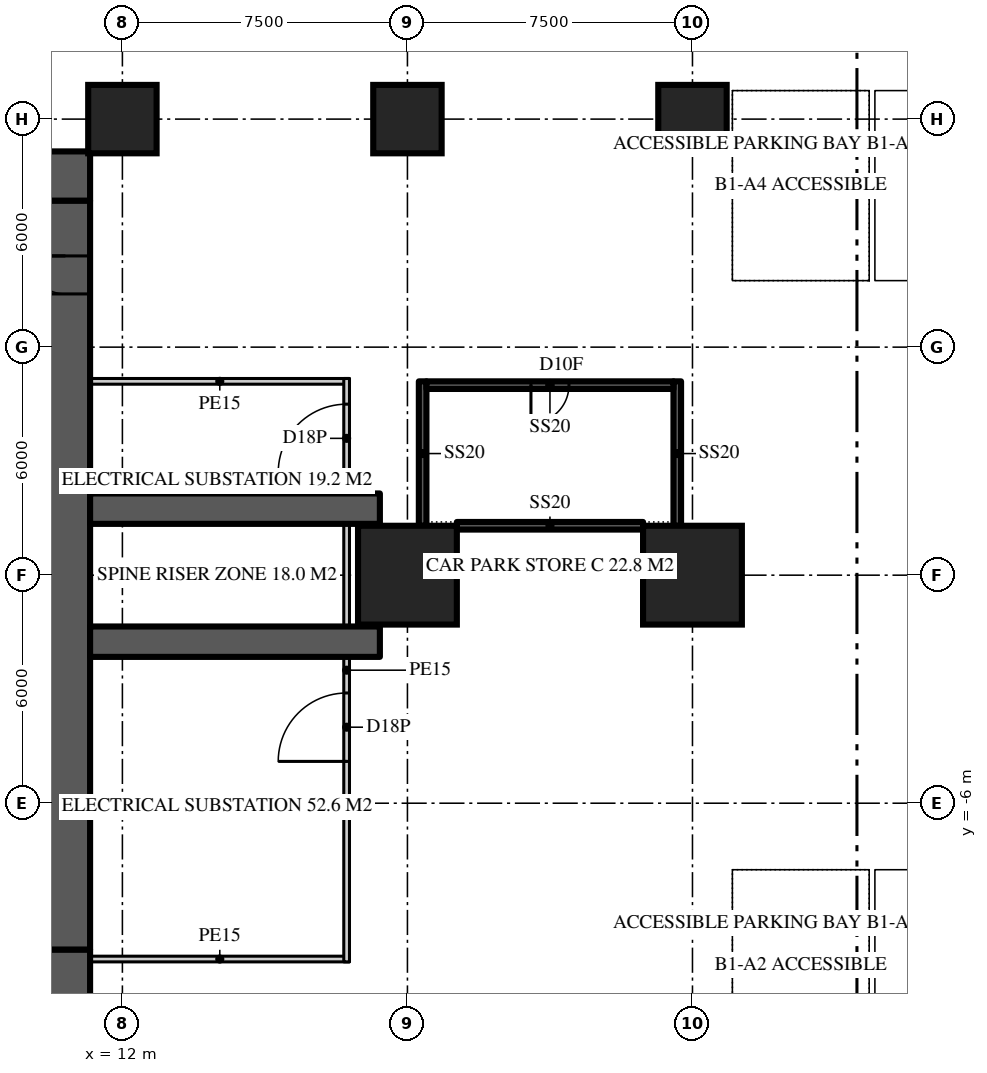
"""IFC4 building model, lengths in metres.
Left out: names, types, materials, properties, quantities, classifications, styles, units other than length and angle.
Written with IfcOpenShell. Run it as: python <this file> out.ifc"""

import sys

from ifc_helpers import new_model, si_unit, direction, frame, frame_2d, origin, origin_2d, place, context, subcontext, project, spatial, rectangle, extrude, element, fill, save


model = new_model("IFC4")
c1 = context("Model", 3, precision=1e-05, world=origin(), true_north=direction((0.0, 1.0)))
c2 = subcontext(c1, "Body", "Model", "MODEL_VIEW")
j1 = project(units=[si_unit("LENGTHUNIT", "METRE"), si_unit("PLANEANGLEUNIT", "RADIAN")], contexts=[c1])
p1 = place(None, origin())
s1 = spatial("IfcSite", under=j1, at=p1, CompositionType="ELEMENT")
p2 = place(p1, origin())
s2 = spatial("IfcBuilding", under=s1, at=p2, CompositionType="ELEMENT")
p3 = place(p2, frame((0.0, 0.0, -5.0)))
s3 = spatial("IfcBuildingStorey", under=s2, at=p3, CompositionType="ELEMENT", Elevation=-5.0)
p4 = place(p3, frame((-11.15, 10.5, 0.0), z_axis=(0.0, 0.0, 1.0), x_axis=(1.0, 0.0, 0.0)))
e1 = element("IfcWall", 1, at=p4, inside=s3, PredefinedType="SHEAR", context=c2, shape_type="SweptSolid", body=[
    extrude(rectangle(XDim=22.3, YDim=1.3, at=frame_2d((11.15, 0.0))), origin(), (0.0, 0.0, 1.0), 5.0),
])
p5 = place(p4, frame((4.25, 0.0, 0.0)))
e2 = element("IfcOpeningElement", 2, at=p5, cuts=e1, PredefinedType="OPENING", context=c2, shape_type="SweptSolid", body=[
    extrude(rectangle(XDim=1.8, YDim=2.2, at=frame_2d((0.9, 1.1))), frame((0.0, 0.66, 0.0), z_axis=(0.0, -1.0, 0.0), x_axis=(1.0, 0.0, 0.0)), (0.0, 0.0, 1.0), 1.32),
])
p6 = place(p4, frame((16.25, 0.0, 0.0)))
e3 = element("IfcOpeningElement", 3, at=p6, cuts=e1, PredefinedType="OPENING", context=c2, shape_type="SweptSolid", body=[
    extrude(rectangle(XDim=1.8, YDim=2.2, at=frame_2d((0.9, 1.1))), frame((0.0, 0.66, 0.0), z_axis=(0.0, -1.0, 0.0), x_axis=(1.0, 0.0, 0.0)), (0.0, 0.0, 1.0), 1.32),
])
p7 = place(p3, frame((11.15, -10.5, 0.0), z_axis=(0.0, 0.0, 1.0), x_axis=(-1.0, 0.0, 0.0)))
e4 = element("IfcWall", 4, at=p7, inside=s3, PredefinedType="SHEAR", context=c2, shape_type="SweptSolid", body=[
    extrude(rectangle(XDim=22.3, YDim=1.3, at=frame_2d((11.15, 0.0))), origin(), (0.0, 0.0, 1.0), 5.0),
])
p8 = place(p7, frame((16.25, 0.0, 0.0)))
e5 = element("IfcOpeningElement", 5, at=p8, cuts=e4, PredefinedType="OPENING", context=c2, shape_type="SweptSolid", body=[
    extrude(rectangle(XDim=1.8, YDim=2.2, at=frame_2d((0.9, 1.1))), frame((0.0, 0.66, 0.0), z_axis=(0.0, -1.0, 0.0), x_axis=(1.0, 0.0, 0.0)), (0.0, 0.0, 1.0), 1.32),
])
p9 = place(p7, frame((4.25, 0.0, 0.0)))
e6 = element("IfcOpeningElement", 6, at=p9, cuts=e4, PredefinedType="OPENING", context=c2, shape_type="SweptSolid", body=[
    extrude(rectangle(XDim=1.8, YDim=2.2, at=frame_2d((0.9, 1.1))), frame((0.0, 0.66, 0.0), z_axis=(0.0, -1.0, 0.0), x_axis=(1.0, 0.0, 0.0)), (0.0, 0.0, 1.0), 1.32),
])
p10 = place(p3, frame((10.5, -9.85, 0.0), z_axis=(0.0, 0.0, 1.0), x_axis=(0.0, 1.0, 0.0)))
e7 = element("IfcWall", 7, at=p10, inside=s3, PredefinedType="SHEAR", context=c2, shape_type="SweptSolid", body=[
    extrude(rectangle(XDim=19.7, YDim=1.3, at=frame_2d((9.85, 0.0))), origin(), (0.0, 0.0, 1.0), 5.0),
])
p11 = place(p10, frame((17.25, 0.0, 0.0)))
e8 = element("IfcOpeningElement", 8, at=p11, cuts=e7, PredefinedType="OPENING", context=c2, shape_type="SweptSolid", body=[
    extrude(rectangle(XDim=1.0, YDim=2.2, at=frame_2d((0.5, 1.1))), frame((0.0, 0.66, 0.0), z_axis=(0.0, -1.0, 0.0), x_axis=(1.0, 0.0, 0.0)), (0.0, 0.0, 1.0), 1.32),
])
for number, where, z_axis, x_axis in (
    (9, (11.15, -1.75, 0.0), (0.0, 0.0, 1.0), (1.0, 0.0, 0.0)),
    (10, (11.15, 1.75, 0.0), (0.0, 0.0, 1.0), (1.0, 0.0, 0.0)),
):
    element("IfcWall", number, at=place(p3, frame(where, z_axis=z_axis, x_axis=x_axis)), inside=s3, PredefinedType="SHEAR", context=c2, shape_type="SweptSolid", body=[
        extrude(rectangle(XDim=7.625, YDim=0.8, at=frame_2d((3.812, 0.0))), origin(), (0.0, 0.0, 1.0), 5.0),
    ])
for number, where, z_axis, x_axis in (
    (11, (19.5, 0.0, 0.0), (0.0, 0.0, 1.0), (1.0, 0.0, 0.0)),
    (12, (27.0, 0.0, 0.0), (0.0, 0.0, 1.0), (1.0, 0.0, 0.0)),
):
    element("IfcColumn", number, at=place(p3, frame(where, z_axis=z_axis, x_axis=x_axis)), inside=s3, PredefinedType="COLUMN", context=c2, shape_type="SweptSolid", body=[
        extrude(rectangle(XDim=2.6, YDim=2.6, at=origin_2d()), origin(), (0.0, 0.0, 1.0), 5.0),
    ])
for number, where, z_axis, x_axis in (
    (13, (12.0, 12.0, 0.0), (0.0, 0.0, 1.0), (1.0, 0.0, 0.0)),
    (14, (19.5, 12.0, 0.0), (0.0, 0.0, 1.0), (1.0, 0.0, 0.0)),
    (15, (27.0, 12.0, 0.0), (0.0, 0.0, 1.0), (1.0, 0.0, 0.0)),
):
    element("IfcColumn", number, at=place(p3, frame(where, z_axis=z_axis, x_axis=x_axis)), inside=s3, PredefinedType="COLUMN", context=c2, shape_type="SweptSolid", body=[
        extrude(rectangle(XDim=1.8, YDim=1.8, at=origin_2d()), origin(), (0.0, 0.0, 1.0), 5.0),
    ])
for number, where, z_axis, x_axis in (
    (16, (11.15, -10.1, 0.0), (0.0, 0.0, 1.0), (1.0, 0.0, 0.0)),
    (17, (11.15, 5.1, 0.0), (0.0, 0.0, 1.0), (1.0, 0.0, 0.0)),
):
    element("IfcWall", number, at=place(p3, frame(where, z_axis=z_axis, x_axis=x_axis)), inside=s3, PredefinedType="SOLIDWALL", context=c2, shape_type="SweptSolid", body=[
        extrude(rectangle(XDim=6.825, YDim=0.15, at=frame_2d((3.413, 0.0))), origin(), (0.0, 0.0, 1.0), 4.6),
    ])
p12 = place(p3, frame((17.9, -10.175, 0.0), z_axis=(0.0, 0.0, 1.0), x_axis=(0.0, 1.0, 0.0)))
e18 = element("IfcWall", 18, at=p12, inside=s3, PredefinedType="SOLIDWALL", context=c2, shape_type="SweptSolid", body=[
    extrude(rectangle(XDim=15.35, YDim=0.15, at=frame_2d((7.675, 0.0))), origin(), (0.0, 0.0, 1.0), 4.6),
])
p13 = place(p12, frame((5.275, 0.0, 0.0)))
e19 = element("IfcOpeningElement", 19, at=p13, cuts=e18, PredefinedType="OPENING", context=c2, shape_type="SweptSolid", body=[
    extrude(rectangle(XDim=1.8, YDim=2.4, at=frame_2d((0.9, 1.2))), frame((0.0, 0.085, 0.0), z_axis=(0.0, -1.0, 0.0), x_axis=(1.0, 0.0, 0.0)), (0.0, 0.0, 1.0), 0.17),
])
p14 = place(p12, frame((12.875, 0.0, 0.0)))
e20 = element("IfcOpeningElement", 20, at=p14, cuts=e18, PredefinedType="OPENING", context=c2, shape_type="SweptSolid", body=[
    extrude(rectangle(XDim=1.8, YDim=2.4, at=frame_2d((0.9, 1.2))), frame((0.0, 0.085, 0.0), z_axis=(0.0, -1.0, 0.0), x_axis=(1.0, 0.0, 0.0)), (0.0, 0.0, 1.0), 0.17),
])
for number, where, z_axis, x_axis in (
    (21, (19.9, 1.3, 0.0), (0.0, 0.0, 1.0), (0.0, 1.0, 0.0)),
    (22, (26.6, 5.1, 0.0), (0.0, 0.0, 1.0), (0.0, -1.0, 0.0)),
):
    element("IfcWall", number, at=place(p3, frame(where, z_axis=z_axis, x_axis=x_axis)), inside=s3, PredefinedType="SOLIDWALL", context=c2, shape_type="SweptSolid", body=[
        extrude(rectangle(XDim=3.8, YDim=0.2, at=frame_2d((1.9, 0.0))), origin(), (0.0, 0.0, 1.0), 4.7),
    ])
p15 = place(p3, frame((20.8, 1.3, 0.0), z_axis=(0.0, 0.0, 1.0), x_axis=(1.0, 0.0, 0.0)))
e23 = element("IfcWall", 23, at=p15, inside=s3, PredefinedType="SOLIDWALL", context=c2, shape_type="SweptSolid", body=[
    extrude(rectangle(XDim=4.9, YDim=0.2, at=frame_2d((2.45, 0.0))), origin(), (0.0, 0.0, 1.0), 4.7),
])
p16 = place(p3, frame((26.5, 5.0, 0.0), z_axis=(0.0, 0.0, 1.0), x_axis=(-1.0, 0.0, 0.0)))
e24 = element("IfcWall", 24, at=p16, inside=s3, PredefinedType="SOLIDWALL", context=c2, shape_type="SweptSolid", body=[
    extrude(rectangle(XDim=6.5, YDim=0.2, at=frame_2d((3.25, 0.0))), origin(), (0.0, 0.0, 1.0), 4.7),
])
p17 = place(p16, frame((2.75, 0.0, 0.0)))
e25 = element("IfcOpeningElement", 25, at=p17, cuts=e24, PredefinedType="OPENING", context=c2, shape_type="SweptSolid", body=[
    extrude(rectangle(XDim=1.0, YDim=2.2, at=frame_2d((0.5, 1.1))), frame((0.0, 0.11, 0.0), z_axis=(0.0, -1.0, 0.0), x_axis=(1.0, 0.0, 0.0)), (0.0, 0.0, 1.0), 0.22),
])
p18 = place(p11, origin())
e26 = element("IfcDoor", 26, at=p18, inside=s3, OperationType="SINGLE_SWING_RIGHT", PredefinedType="DOOR", context=c2, shape_type="SweptSolid", body=[
    extrude(rectangle(XDim=1.0, YDim=2.2, at=frame_2d((0.5, 1.1))), frame((0.0, 0.025, 0.0), z_axis=(0.0, -1.0, 0.0), x_axis=(1.0, 0.0, 0.0)), (0.0, 0.0, 1.0), 0.05),
])
fill(e8, e26)
p19 = place(p13, origin())
e27 = element("IfcDoor", 27, at=p19, inside=s3, OperationType="DOUBLE_DOOR_DOUBLE_SWING", PredefinedType="DOOR", context=c2, shape_type="SweptSolid", body=[
    extrude(rectangle(XDim=1.8, YDim=2.4, at=frame_2d((0.9, 1.2))), frame((0.0, 0.025, 0.0), z_axis=(0.0, -1.0, 0.0), x_axis=(1.0, 0.0, 0.0)), (0.0, 0.0, 1.0), 0.05),
])
fill(e19, e27)
p20 = place(p14, origin())
e28 = element("IfcDoor", 28, at=p20, inside=s3, OperationType="DOUBLE_DOOR_DOUBLE_SWING", PredefinedType="DOOR", context=c2, shape_type="SweptSolid", body=[
    extrude(rectangle(XDim=1.8, YDim=2.4, at=frame_2d((0.9, 1.2))), frame((0.0, 0.025, 0.0), z_axis=(0.0, -1.0, 0.0), x_axis=(1.0, 0.0, 0.0)), (0.0, 0.0, 1.0), 0.05),
])
fill(e20, e28)
p21 = place(p17, origin())
e29 = element("IfcDoor", 29, at=p21, inside=s3, OperationType="SINGLE_SWING_RIGHT", PredefinedType="DOOR", context=c2, shape_type="SweptSolid", body=[
    extrude(rectangle(XDim=1.0, YDim=2.2, at=frame_2d((0.5, 1.1))), frame((0.0, 0.025, 0.0), z_axis=(0.0, -1.0, 0.0), x_axis=(1.0, 0.0, 0.0)), (0.0, 0.0, 1.0), 0.05),
])
fill(e25, e29)
save(model, sys.argv[1])
